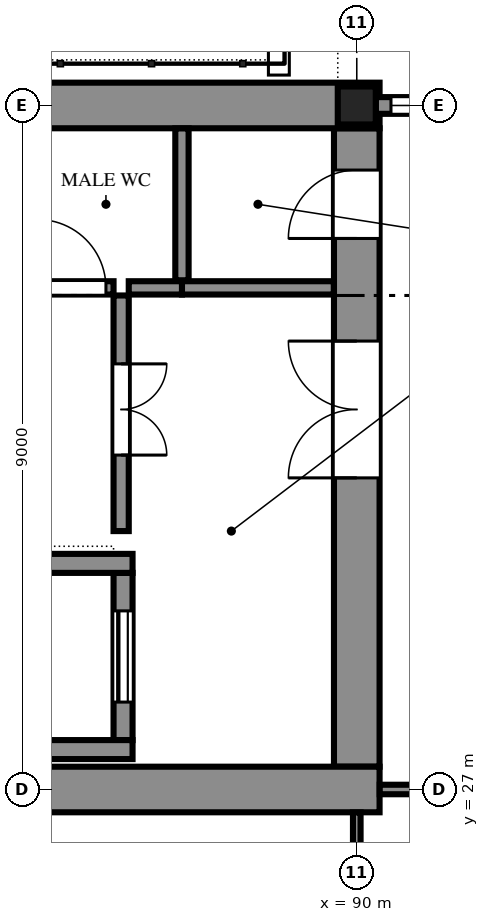
"""IFC4 building model, lengths in metres.
Left out: names, types, materials, properties, quantities, classifications, styles, units other than length and angle.
Written with IfcOpenShell. Run it as: python <this file> out.ifc"""

import sys

from ifc_helpers import new_model, si_unit, direction, frame, frame_2d, origin, origin_2d, place, context, subcontext, project, spatial, polyline, rectangle, hollow_rectangle, outline, extrude, element, fill, save


model = new_model("IFC4")
c1 = context("Model", 3, precision=1e-05, world=origin(), true_north=direction((0.0, 1.0)))
c2 = subcontext(c1, "Body", "Model", "MODEL_VIEW")
j1 = project(units=[si_unit("LENGTHUNIT", "METRE"), si_unit("PLANEANGLEUNIT", "RADIAN")], contexts=[c1])
p1 = place(None, origin())
s1 = spatial("IfcSite", under=j1, at=p1, CompositionType="ELEMENT")
p2 = place(p1, origin())
s2 = spatial("IfcBuilding", under=s1, at=p2, CompositionType="ELEMENT")
p3 = place(p2, frame((0.0, 0.0, 7.5)))
s3 = spatial("IfcBuildingStorey", under=s2, at=p3, CompositionType="ELEMENT", Elevation=7.5)
p4 = place(p3, frame((90.0, 36.0, 0.0), z_axis=(0.0, 0.0, 1.0), x_axis=(1.0, 0.0, 0.0)))
e1 = element("IfcColumn", 1, at=p4, inside=s3, PredefinedType="COLUMN", context=c2, shape_type="SweptSolid", body=[
    extrude(hollow_rectangle(XDim=0.5, YDim=0.5, WallThickness=0.032, at=origin_2d()), origin(), (0.0, 0.0, 1.0), 4.2),
])
p5 = place(p3, frame((71.7, 27.0, 0.0), z_axis=(0.0, 0.0, 1.0), x_axis=(1.0, 0.0, 0.0)))
e2 = element("IfcWall", 2, at=p5, inside=s3, PredefinedType="SOLIDWALL", context=c2, shape_type="SweptSolid", body=[
    extrude(rectangle(XDim=18.6, YDim=0.6, at=frame_2d((9.3, 0.0))), origin(), (0.0, 0.0, 1.0), 4.2),
])
p6 = place(p3, frame((71.7, 36.0, 0.0), z_axis=(0.0, 0.0, 1.0), x_axis=(1.0, 0.0, 0.0)))
e3 = element("IfcWall", 3, at=p6, inside=s3, PredefinedType="SOLIDWALL", context=c2, shape_type="SweptSolid", body=[
    extrude(rectangle(XDim=18.6, YDim=0.6, at=frame_2d((9.3, 0.0))), origin(), (0.0, 0.0, 1.0), 4.2),
])
p7 = place(p6, frame((1.6, 0.0, 0.0)))
e4 = element("IfcOpeningElement", 4, at=p7, cuts=e3, PredefinedType="OPENING", context=c2, shape_type="SweptSolid", body=[
    extrude(rectangle(XDim=1.8, YDim=2.1, at=frame_2d((0.9, 1.05))), frame((0.0, 0.31, 0.0), z_axis=(0.0, -1.0, 0.0), x_axis=(1.0, 0.0, 0.0)), (0.0, 0.0, 1.0), 0.62),
])
p8 = place(p6, frame((5.6, 0.0, 0.0)))
e5 = element("IfcOpeningElement", 5, at=p8, cuts=e3, PredefinedType="OPENING", context=c2, shape_type="SweptSolid", body=[
    extrude(rectangle(XDim=1.8, YDim=2.1, at=frame_2d((0.9, 1.05))), frame((0.0, 0.31, 0.0), z_axis=(0.0, -1.0, 0.0), x_axis=(1.0, 0.0, 0.0)), (0.0, 0.0, 1.0), 0.62),
])
p9 = place(p6, frame((9.1, 0.0, 0.0)))
e6 = element("IfcOpeningElement", 6, at=p9, cuts=e3, PredefinedType="OPENING", context=c2, shape_type="SweptSolid", body=[
    extrude(rectangle(XDim=1.8, YDim=2.1, at=frame_2d((0.9, 1.05))), frame((0.0, 0.31, 0.0), z_axis=(0.0, -1.0, 0.0), x_axis=(1.0, 0.0, 0.0)), (0.0, 0.0, 1.0), 0.62),
])
p10 = place(p3, frame((90.0, 27.3, 0.0), z_axis=(0.0, 0.0, 1.0), x_axis=(0.0, 1.0, 0.0)))
e7 = element("IfcWall", 7, at=p10, inside=s3, PredefinedType="SOLIDWALL", context=c2, shape_type="SweptSolid", body=[
    extrude(rectangle(XDim=8.4, YDim=0.6, at=frame_2d((4.2, 0.0))), origin(), (0.0, 0.0, 1.0), 4.2),
])
p11 = place(p10, frame((3.8, 0.0, 0.0)))
e8 = element("IfcOpeningElement", 8, at=p11, cuts=e7, PredefinedType="OPENING", context=c2, shape_type="SweptSolid", body=[
    extrude(rectangle(XDim=1.8, YDim=2.1, at=frame_2d((0.9, 1.05))), frame((0.0, 0.31, 0.0), z_axis=(0.0, -1.0, 0.0), x_axis=(1.0, 0.0, 0.0)), (0.0, 0.0, 1.0), 0.62),
])
p12 = place(p10, frame((6.95, 0.0, 0.0)))
e9 = element("IfcOpeningElement", 9, at=p12, cuts=e7, PredefinedType="OPENING", context=c2, shape_type="SweptSolid", body=[
    extrude(rectangle(XDim=0.9, YDim=2.1, at=frame_2d((0.45, 1.05))), frame((0.0, 0.31, 0.0), z_axis=(0.0, -1.0, 0.0), x_axis=(1.0, 0.0, 0.0)), (0.0, 0.0, 1.0), 0.62),
])
p13 = place(p3, frame((90.25, 36.0, 0.0), z_axis=(0.0, 0.0, 1.0), x_axis=(1.0, 0.0, 0.0)))
e10 = element("IfcWall", 10, at=p13, inside=s3, PredefinedType="SOLIDWALL", context=c2, shape_type="SweptSolid", body=[
    extrude(rectangle(XDim=8.445, YDim=0.22, at=frame_2d((4.223, 0.0))), origin(), (0.0, 0.0, 1.0), 3.597),
])
p14 = place(p13, frame((0.2, 0.0, 0.9)))
e11 = element("IfcOpeningElement", 11, at=p14, cuts=e10, PredefinedType="OPENING", context=c2, shape_type="SweptSolid", body=[
    extrude(rectangle(XDim=2.1, YDim=2.1, at=frame_2d((1.05, 1.05))), frame((0.0, 0.12, 0.0), z_axis=(0.0, -1.0, 0.0), x_axis=(1.0, 0.0, 0.0)), (0.0, 0.0, 1.0), 0.24),
])
p15 = place(p13, frame((3.2, 0.0, 0.9)))
e12 = element("IfcOpeningElement", 12, at=p15, cuts=e10, PredefinedType="OPENING", context=c2, shape_type="SweptSolid", body=[
    extrude(rectangle(XDim=2.1, YDim=2.1, at=frame_2d((1.05, 1.05))), frame((0.0, 0.12, 0.0), z_axis=(0.0, -1.0, 0.0), x_axis=(1.0, 0.0, 0.0)), (0.0, 0.0, 1.0), 0.24),
])
p16 = place(p13, frame((6.2, 0.0, 0.9)))
e13 = element("IfcOpeningElement", 13, at=p16, cuts=e10, PredefinedType="OPENING", context=c2, shape_type="SweptSolid", body=[
    extrude(rectangle(XDim=2.1, YDim=2.1, at=frame_2d((1.05, 1.05))), frame((0.0, 0.12, 0.0), z_axis=(0.0, -1.0, 0.0), x_axis=(1.0, 0.0, 0.0)), (0.0, 0.0, 1.0), 0.24),
])
for number, where, z_axis, x_axis in (
    (14, (83.65, 27.525, 0.0), (0.0, 0.0, 1.0), (1.0, 0.0, 0.0)),
    (15, (83.65, 29.975, 0.0), (0.0, 0.0, 1.0), (1.0, 0.0, 0.0)),
):
    element("IfcWall", number, at=place(p3, frame(where, z_axis=z_axis, x_axis=x_axis)), inside=s3, PredefinedType="SOLIDWALL", context=c2, shape_type="SweptSolid", body=[
        extrude(rectangle(XDim=3.4, YDim=0.25, at=frame_2d((1.7, 0.0))), origin(), (0.0, 0.0, 1.0), 3.516),
    ])
p17 = place(p3, frame((86.925, 27.65, 0.0), z_axis=(0.0, 0.0, 1.0), x_axis=(0.0, 1.0, 0.0)))
e16 = element("IfcWall", 16, at=p17, inside=s3, PredefinedType="SOLIDWALL", context=c2, shape_type="SweptSolid", body=[
    extrude(rectangle(XDim=2.2, YDim=0.25, at=frame_2d((1.1, 0.0))), origin(), (0.0, 0.0, 1.0), 3.516),
])
p18 = place(p17, frame((0.5, 0.0, 0.0)))
e17 = element("IfcOpeningElement", 17, at=p18, cuts=e16, PredefinedType="OPENING", context=c2, shape_type="SweptSolid", body=[
    extrude(rectangle(XDim=1.2, YDim=2.1, at=frame_2d((0.6, 1.05))), frame((0.0, 0.135, 0.0), z_axis=(0.0, -1.0, 0.0), x_axis=(1.0, 0.0, 0.0)), (0.0, 0.0, 1.0), 0.27),
])
p19 = place(p3, frame((98.872, 27.0, 0.0), z_axis=(0.0, 0.0, 1.0), x_axis=(-1.0, 0.0, 0.0)))
e18 = element("IfcWall", 18, at=p19, inside=s3, PredefinedType="PARTITIONING", context=c2, shape_type="SweptSolid", body=[
    extrude(rectangle(XDim=8.57, YDim=0.125, at=frame_2d((4.285, 0.0))), origin(), (0.0, 0.0, 1.0), 3.307),
])
p20 = place(p19, frame((3.772, 0.0, 0.0)))
e19 = element("IfcOpeningElement", 19, at=p20, cuts=e18, PredefinedType="OPENING", context=c2, shape_type="SweptSolid", body=[
    extrude(rectangle(XDim=1.2, YDim=2.1, at=frame_2d((0.6, 1.05))), frame((0.0, 0.073, 0.0), z_axis=(0.0, -1.0, 0.0), x_axis=(1.0, 0.0, 0.0)), (0.0, 0.0, 1.0), 0.145),
])
p21 = place(p3, frame((90.0, 26.698, 0.0), z_axis=(0.0, 0.0, 1.0), x_axis=(0.0, -1.0, 0.0)))
e20 = element("IfcWall", 20, at=p21, inside=s3, PredefinedType="PARTITIONING", context=c2, shape_type="SweptSolid", body=[
    extrude(rectangle(XDim=5.635, YDim=0.1, at=frame_2d((2.818, 0.0))), origin(), (0.0, 0.0, 1.0), 3.643),
])
p22 = place(p3, frame((86.9, 33.5, 0.0), z_axis=(0.0, 0.0, 1.0), x_axis=(0.0, -1.0, 0.0)))
e21 = element("IfcWall", 21, at=p22, inside=s3, PredefinedType="PARTITIONING", context=c2, shape_type="SweptSolid", body=[
    extrude(rectangle(XDim=3.1, YDim=0.2, at=frame_2d((1.55, 0.0))), origin(), (0.0, 0.0, 1.0), 3.382),
])
p23 = place(p22, frame((0.9, 0.0, 0.0)))
e22 = element("IfcOpeningElement", 22, at=p23, cuts=e21, PredefinedType="OPENING", context=c2, shape_type="SweptSolid", body=[
    extrude(rectangle(XDim=1.2, YDim=2.1, at=frame_2d((0.6, 1.05))), frame((0.0, 0.11, 0.0), z_axis=(0.0, -1.0, 0.0), x_axis=(1.0, 0.0, 0.0)), (0.0, 0.0, 1.0), 0.22),
])
p24 = place(p3, frame((85.7, 33.6, 0.0), z_axis=(0.0, 0.0, 1.0), x_axis=(1.0, 0.0, 0.0)))
e23 = element("IfcWall", 23, at=p24, inside=s3, PredefinedType="PARTITIONING", context=c2, shape_type="SweptSolid", body=[
    extrude(rectangle(XDim=1.1, YDim=0.175, at=frame_2d((0.55, 0.0))), origin(), (0.0, 0.0, 1.0), 3.307),
])
p25 = place(p24, frame((0.1, 0.0, 0.0)))
e24 = element("IfcOpeningElement", 24, at=p25, cuts=e23, PredefinedType="OPENING", context=c2, shape_type="SweptSolid", body=[
    extrude(rectangle(XDim=0.9, YDim=2.1, at=frame_2d((0.45, 1.05))), frame((0.0, 0.097, 0.0), z_axis=(0.0, -1.0, 0.0), x_axis=(1.0, 0.0, 0.0)), (0.0, 0.0, 1.0), 0.195),
])
p26 = place(p3, frame((87.7, 33.6, 0.0), z_axis=(0.0, 0.0, 1.0), x_axis=(1.0, 0.0, 0.0)))
e25 = element("IfcWall", 25, at=p26, inside=s3, PredefinedType="PARTITIONING", context=c2, shape_type="SweptSolid", body=[
    extrude(rectangle(XDim=1.998, YDim=0.175, at=frame_2d((0.999, 0.0))), origin(), (0.0, 0.0, 1.0), 3.307),
])
p27 = place(p3, frame((87.0, 33.6, 0.0), z_axis=(0.0, 0.0, 1.0), x_axis=(1.0, 0.0, 0.0)))
e26 = element("IfcWall", 26, at=p27, inside=s3, PredefinedType="PARTITIONING", context=c2, shape_type="SweptSolid", body=[
    extrude(rectangle(XDim=0.7, YDim=0.175, at=frame_2d((0.35, 0.0))), origin(), (0.0, 0.0, 1.0), 3.307),
])
p28 = place(p3, frame((87.7, 35.698, 0.0), z_axis=(0.0, 0.0, 1.0), x_axis=(0.0, -1.0, 0.0)))
e27 = element("IfcWall", 27, at=p28, inside=s3, PredefinedType="PARTITIONING", context=c2, shape_type="SweptSolid", body=[
    extrude(rectangle(XDim=1.998, YDim=0.175, at=frame_2d((0.999, 0.0))), origin(), (0.0, 0.0, 1.0), 3.307),
])
p29 = place(p14, origin())
e28 = element("IfcWindow", 28, at=p29, inside=s3, PartitioningType="DOUBLE_PANEL_VERTICAL", PredefinedType="WINDOW", context=c2, shape_type="SweptSolid", body=[
    extrude(outline(polyline([(0.0, 0.0), (2.1, 0.0), (2.1, 2.1), (0.0, 2.1), (0.0, 0.0)]), holes=[polyline([(0.07, 0.07), (2.03, 0.07), (2.03, 2.03), (0.07, 2.03), (0.07, 0.07)])]), frame((0.0, 0.03, 0.0), z_axis=(0.0, -1.0, 0.0), x_axis=(1.0, 0.0, 0.0)), (0.0, 0.0, 1.0), 0.06),
    extrude(rectangle(XDim=0.04, YDim=1.96, at=frame_2d((1.05, 1.05))), frame((0.0, 0.022, 0.0), z_axis=(0.0, -1.0, 0.0), x_axis=(1.0, 0.0, 0.0)), (0.0, 0.0, 1.0), 0.044),
    extrude(outline(polyline([(0.07, 0.07), (1.03, 0.07), (1.03, 2.03), (0.07, 2.03), (0.07, 0.07)]), holes=[polyline([(0.1, 0.1), (1.0, 0.1), (1.0, 2.0), (0.1, 2.0), (0.1, 0.1)])]), frame((0.0, 0.022, 0.0), z_axis=(0.0, -1.0, 0.0), x_axis=(1.0, 0.0, 0.0)), (0.0, 0.0, 1.0), 0.045),
    extrude(rectangle(XDim=0.9, YDim=1.9, at=frame_2d((0.55, 1.05))), frame((0.0, 0.006, 0.0), z_axis=(0.0, -1.0, 0.0), x_axis=(1.0, 0.0, 0.0)), (0.0, 0.0, 1.0), 0.012),
    extrude(outline(polyline([(1.07, 0.07), (2.03, 0.07), (2.03, 2.03), (1.07, 2.03), (1.07, 0.07)]), holes=[polyline([(1.1, 0.1), (2.0, 0.1), (2.0, 2.0), (1.1, 2.0), (1.1, 0.1)])]), frame((0.0, 0.022, 0.0), z_axis=(0.0, -1.0, 0.0), x_axis=(1.0, 0.0, 0.0)), (0.0, 0.0, 1.0), 0.045),
    extrude(rectangle(XDim=0.9, YDim=1.9, at=frame_2d((1.55, 1.05))), frame((0.0, 0.006, 0.0), z_axis=(0.0, -1.0, 0.0), x_axis=(1.0, 0.0, 0.0)), (0.0, 0.0, 1.0), 0.012),
])
fill(e11, e28)
p30 = place(p18, origin())
e29 = element("IfcDoor", 29, at=p30, inside=s3, OperationType="SLIDING_TO_LEFT", PredefinedType="DOOR", context=c2, shape_type="SweptSolid", body=[
    extrude(outline(polyline([(0.0, 0.0), (0.07, 0.0), (0.07, 2.03), (1.13, 2.03), (1.13, 0.0), (1.2, 0.0), (1.2, 2.1), (0.0, 2.1), (0.0, 0.0)])), frame((0.0, 0.025, 0.0), z_axis=(0.0, -1.0, 0.0), x_axis=(1.0, 0.0, 0.0)), (0.0, 0.0, 1.0), 0.05),
    extrude(rectangle(XDim=0.579, YDim=2.016, at=frame_2d((0.363, 1.018))), frame((0.0, 0.018, 0.0), z_axis=(0.0, -1.0, 0.0), x_axis=(1.0, 0.0, 0.0)), (0.0, 0.0, 1.0), 0.016),
    extrude(rectangle(XDim=0.575, YDim=2.016, at=frame_2d((0.839, 1.018))), frame((0.0, -0.002, 0.0), z_axis=(0.0, -1.0, 0.0), x_axis=(1.0, 0.0, 0.0)), (0.0, 0.0, 1.0), 0.016),
])
fill(e17, e29)
p31 = place(p23, origin())
e30 = element("IfcDoor", 30, at=p31, inside=s3, OperationType="DOUBLE_DOOR_SINGLE_SWING", PredefinedType="DOOR", context=c2, shape_type="SweptSolid", body=[
    extrude(outline(polyline([(0.0, 0.0), (0.07, 0.0), (0.07, 2.03), (1.13, 2.03), (1.13, 0.0), (1.2, 0.0), (1.2, 2.1), (0.0, 2.1), (0.0, 0.0)])), frame((0.0, 0.025, 0.0), z_axis=(0.0, -1.0, 0.0), x_axis=(1.0, 0.0, 0.0)), (0.0, 0.0, 1.0), 0.05),
    extrude(outline(polyline([(0.074, 0.01), (0.597, 0.01), (0.597, 2.026), (0.074, 2.026), (0.074, 0.01)]), holes=[polyline([(0.178, 0.373), (0.492, 0.373), (0.492, 1.784), (0.178, 1.784), (0.178, 0.373)])]), frame((0.0, 0.017, 0.0), z_axis=(0.0, -1.0, 0.0), x_axis=(1.0, 0.0, 0.0)), (0.0, 0.0, 1.0), 0.035),
    extrude(rectangle(XDim=0.314, YDim=1.411, at=frame_2d((0.335, 1.079))), frame((0.0, 0.009, 0.0), z_axis=(0.0, -1.0, 0.0), x_axis=(1.0, 0.0, 0.0)), (0.0, 0.0, 1.0), 0.017),
    extrude(outline(polyline([(0.603, 0.01), (1.126, 0.01), (1.126, 2.026), (0.603, 2.026), (0.603, 0.01)]), holes=[polyline([(0.708, 0.373), (1.021, 0.373), (1.021, 1.784), (0.708, 1.784), (0.708, 0.373)])]), frame((0.0, 0.017, 0.0), z_axis=(0.0, -1.0, 0.0), x_axis=(1.0, 0.0, 0.0)), (0.0, 0.0, 1.0), 0.035),
    extrude(rectangle(XDim=0.314, YDim=1.411, at=frame_2d((0.865, 1.079))), frame((0.0, 0.009, 0.0), z_axis=(0.0, -1.0, 0.0), x_axis=(1.0, 0.0, 0.0)), (0.0, 0.0, 1.0), 0.017),
])
fill(e22, e30)
p32 = place(p11, origin())
e31 = element("IfcDoor", 31, at=p32, inside=s3, OperationType="DOUBLE_DOOR_SINGLE_SWING", PredefinedType="DOOR", context=c2, shape_type="SweptSolid", body=[
    extrude(outline(polyline([(0.0, 0.0), (0.07, 0.0), (0.07, 2.03), (1.73, 2.03), (1.73, 0.0), (1.8, 0.0), (1.8, 2.1), (0.0, 2.1), (0.0, 0.0)])), frame((0.0, 0.025, 0.0), z_axis=(0.0, -1.0, 0.0), x_axis=(1.0, 0.0, 0.0)), (0.0, 0.0, 1.0), 0.05),
    extrude(outline(polyline([(0.074, 0.01), (0.897, 0.01), (0.897, 2.026), (0.074, 2.026), (0.074, 0.01)]), holes=[polyline([(0.194, 0.16), (0.777, 0.16), (0.777, 1.01), (0.194, 1.01), (0.194, 0.16)]), polyline([(0.335, 1.16), (0.635, 1.16), (0.635, 1.76), (0.335, 1.76), (0.335, 1.16)])]), frame((0.0, 0.017, 0.0), z_axis=(0.0, -1.0, 0.0), x_axis=(1.0, 0.0, 0.0)), (0.0, 0.0, 1.0), 0.035),
    extrude(rectangle(XDim=0.583, YDim=0.85, at=frame_2d((0.485, 0.585))), frame((0.0, 0.009, 0.0), z_axis=(0.0, -1.0, 0.0), x_axis=(1.0, 0.0, 0.0)), (0.0, 0.0, 1.0), 0.017),
    extrude(rectangle(XDim=0.3, YDim=0.6, at=frame_2d((0.485, 1.46))), frame((0.0, 0.006, 0.0), z_axis=(0.0, -1.0, 0.0), x_axis=(1.0, 0.0, 0.0)), (0.0, 0.0, 1.0), 0.012),
    extrude(outline(polyline([(0.903, 0.01), (1.726, 0.01), (1.726, 2.026), (0.903, 2.026), (0.903, 0.01)]), holes=[polyline([(1.023, 0.16), (1.606, 0.16), (1.606, 1.01), (1.023, 1.01), (1.023, 0.16)]), polyline([(1.165, 1.16), (1.465, 1.16), (1.465, 1.76), (1.165, 1.76), (1.165, 1.16)])]), frame((0.0, 0.017, 0.0), z_axis=(0.0, -1.0, 0.0), x_axis=(1.0, 0.0, 0.0)), (0.0, 0.0, 1.0), 0.035),
    extrude(rectangle(XDim=0.583, YDim=0.85, at=frame_2d((1.314, 0.585))), frame((0.0, 0.009, 0.0), z_axis=(0.0, -1.0, 0.0), x_axis=(1.0, 0.0, 0.0)), (0.0, 0.0, 1.0), 0.017),
    extrude(rectangle(XDim=0.3, YDim=0.6, at=frame_2d((1.314, 1.46))), frame((0.0, 0.006, 0.0), z_axis=(0.0, -1.0, 0.0), x_axis=(1.0, 0.0, 0.0)), (0.0, 0.0, 1.0), 0.012),
])
fill(e8, e31)
p33 = place(p25, origin())
e32 = element("IfcDoor", 32, at=p33, inside=s3, OperationType="SINGLE_SWING_LEFT", PredefinedType="DOOR", context=c2, shape_type="SweptSolid", body=[
    extrude(outline(polyline([(0.0, 0.0), (0.07, 0.0), (0.07, 2.03), (0.83, 2.03), (0.83, 0.0), (0.9, 0.0), (0.9, 2.1), (0.0, 2.1), (0.0, 0.0)])), frame((0.0, 0.025, 0.0), z_axis=(0.0, -1.0, 0.0), x_axis=(1.0, 0.0, 0.0)), (0.0, 0.0, 1.0), 0.05),
    extrude(outline(polyline([(0.074, 0.01), (0.826, 0.01), (0.826, 2.026), (0.074, 2.026), (0.074, 0.01)]), holes=[polyline([(0.194, 0.16), (0.706, 0.16), (0.706, 1.01), (0.194, 1.01), (0.194, 0.16)]), polyline([(0.3, 1.16), (0.6, 1.16), (0.6, 1.76), (0.3, 1.76), (0.3, 1.16)])]), frame((0.0, 0.017, 0.0), z_axis=(0.0, -1.0, 0.0), x_axis=(1.0, 0.0, 0.0)), (0.0, 0.0, 1.0), 0.035),
    extrude(rectangle(XDim=0.512, YDim=0.85, at=frame_2d((0.45, 0.585))), frame((0.0, 0.009, 0.0), z_axis=(0.0, -1.0, 0.0), x_axis=(1.0, 0.0, 0.0)), (0.0, 0.0, 1.0), 0.017),
    extrude(rectangle(XDim=0.3, YDim=0.6, at=frame_2d((0.45, 1.46))), frame((0.0, 0.006, 0.0), z_axis=(0.0, -1.0, 0.0), x_axis=(1.0, 0.0, 0.0)), (0.0, 0.0, 1.0), 0.012),
])
fill(e24, e32)
p34 = place(p12, origin())
e33 = element("IfcDoor", 33, at=p34, inside=s3, OperationType="SINGLE_SWING_LEFT", PredefinedType="DOOR", context=c2, shape_type="SweptSolid", body=[
    extrude(outline(polyline([(0.0, 0.0), (0.07, 0.0), (0.07, 2.03), (0.83, 2.03), (0.83, 0.0), (0.9, 0.0), (0.9, 2.1), (0.0, 2.1), (0.0, 0.0)])), frame((0.0, 0.025, 0.0), z_axis=(0.0, -1.0, 0.0), x_axis=(1.0, 0.0, 0.0)), (0.0, 0.0, 1.0), 0.05),
    extrude(outline(polyline([(0.074, 0.01), (0.826, 0.01), (0.826, 2.026), (0.074, 2.026), (0.074, 0.01)]), holes=[polyline([(0.194, 0.16), (0.706, 0.16), (0.706, 1.01), (0.194, 1.01), (0.194, 0.16)]), polyline([(0.3, 1.16), (0.6, 1.16), (0.6, 1.76), (0.3, 1.76), (0.3, 1.16)])]), frame((0.0, 0.017, 0.0), z_axis=(0.0, -1.0, 0.0), x_axis=(1.0, 0.0, 0.0)), (0.0, 0.0, 1.0), 0.035),
    extrude(rectangle(XDim=0.512, YDim=0.85, at=frame_2d((0.45, 0.585))), frame((0.0, 0.009, 0.0), z_axis=(0.0, -1.0, 0.0), x_axis=(1.0, 0.0, 0.0)), (0.0, 0.0, 1.0), 0.017),
    extrude(rectangle(XDim=0.3, YDim=0.6, at=frame_2d((0.45, 1.46))), frame((0.0, 0.006, 0.0), z_axis=(0.0, -1.0, 0.0), x_axis=(1.0, 0.0, 0.0)), (0.0, 0.0, 1.0), 0.012),
])
fill(e9, e33)
save(model, sys.argv[1])
